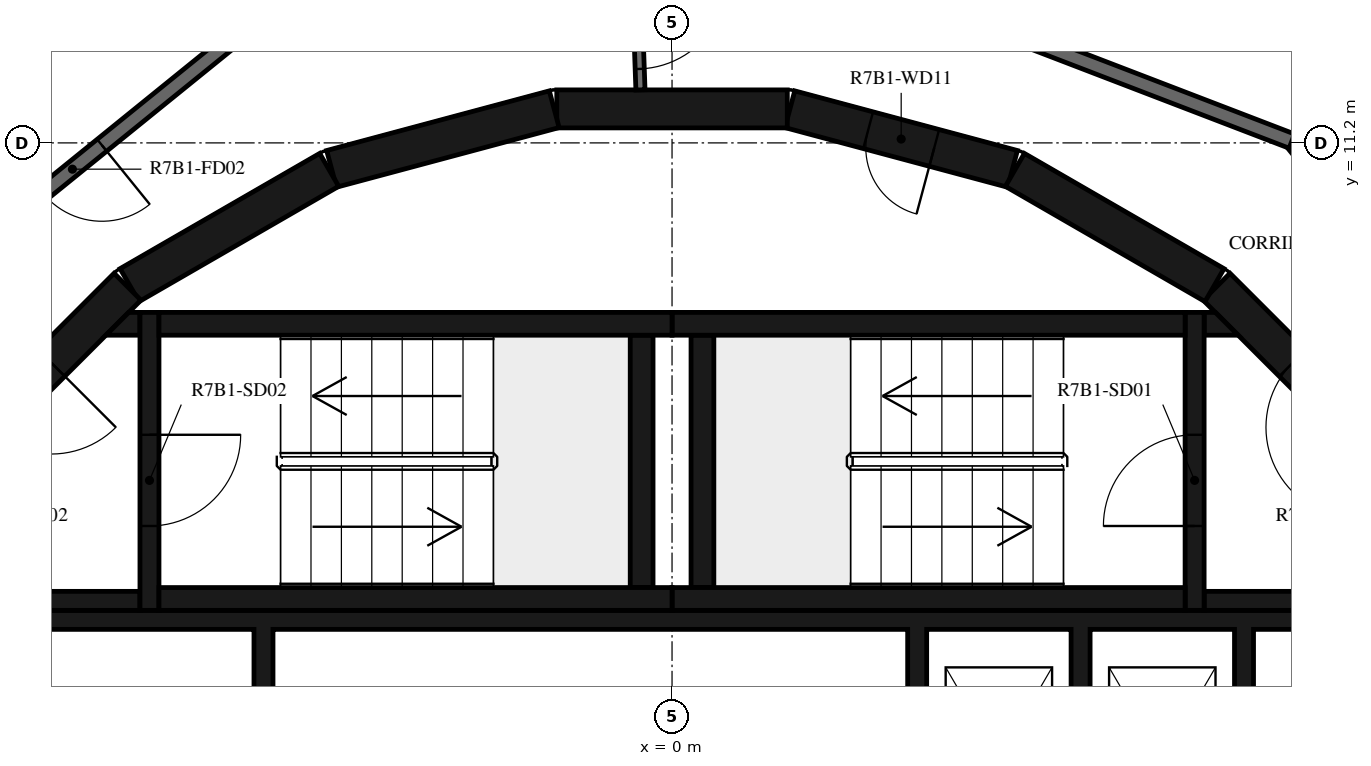
"""IFC4 building model, lengths in metres.
Left out: names, types, materials, properties, quantities, classifications, styles, units other than length and angle.
Written with IfcOpenShell. Run it as: python <this file> out.ifc"""

import sys

from ifc_helpers import new_model, si_unit, direction, frame, frame_2d, origin, place, context, subcontext, project, spatial, polyline, rectangle, outline, extrude, element, fill, save


model = new_model("IFC4")
c1 = context("Model", 3, precision=1e-05, world=origin(), true_north=direction((0.0, 1.0)))
c2 = subcontext(c1, "Body", "Model", "MODEL_VIEW")
j1 = project(units=[si_unit("LENGTHUNIT", "METRE"), si_unit("PLANEANGLEUNIT", "RADIAN")], contexts=[c1])
p1 = place(None, origin())
s1 = spatial("IfcSite", under=j1, at=p1, CompositionType="ELEMENT")
p2 = place(p1, origin())
s2 = spatial("IfcBuilding", under=s1, at=p2, CompositionType="ELEMENT")
p3 = place(p2, frame((0.0, 0.0, 273.9)))
s3 = spatial("IfcBuildingStorey", under=s2, at=p3, CompositionType="ELEMENT", Elevation=273.9)
p4 = place(p3, frame((9.308, 7.164, 0.0), z_axis=(0.0, 0.0, 1.0), x_axis=(-0.707106781187, 0.707106781187, 0.0)))
e1 = element("IfcWall", 1, at=p4, inside=s3, PredefinedType="SHEAR", context=c2, shape_type="SweptSolid", body=[
    extrude(rectangle(XDim=3.032, YDim=0.5, at=frame_2d((1.516, 0.0))), origin(), (0.0, 0.0, 1.0), 3.12),
])
p5 = place(p4, frame((0.416, 0.0, 0.0)))
e2 = element("IfcOpeningElement", 2, at=p5, cuts=e1, PredefinedType="OPENING", context=c2, shape_type="SweptSolid", body=[
    extrude(rectangle(XDim=1.2, YDim=2.1, at=frame_2d((0.6, 1.05))), frame((0.0, 0.26, 0.0), z_axis=(0.0, -1.0, 0.0), x_axis=(1.0, 0.0, 0.0)), (0.0, 0.0, 1.0), 0.52),
])
p6 = place(p3, frame((7.137, 9.329, 0.0), z_axis=(0.0, 0.0, 1.0), x_axis=(-0.865975092491, 0.500087131594, 0.0)))
e3 = element("IfcWall", 3, at=p6, inside=s3, PredefinedType="SHEAR", context=c2, shape_type="SweptSolid", body=[
    extrude(rectangle(XDim=3.033, YDim=0.5, at=frame_2d((1.516, 0.0))), origin(), (0.0, 0.0, 1.0), 3.12),
])
p7 = place(p3, frame((4.479, 10.858, 0.0), z_axis=(0.0, 0.0, 1.0), x_axis=(-0.965948410781, 0.258734743916, 0.0)))
e4 = element("IfcWall", 4, at=p7, inside=s3, PredefinedType="SHEAR", context=c2, shape_type="SweptSolid", body=[
    extrude(rectangle(XDim=3.033, YDim=0.5, at=frame_2d((1.516, 0.0))), origin(), (0.0, 0.0, 1.0), 3.12),
])
p8 = place(p7, frame((1.066, 0.0, 0.0)))
e5 = element("IfcOpeningElement", 5, at=p8, cuts=e4, PredefinedType="OPENING", context=c2, shape_type="SweptSolid", body=[
    extrude(rectangle(XDim=0.9, YDim=2.1, at=frame_2d((0.45, 1.05))), frame((0.0, 0.26, 0.0), z_axis=(0.0, -1.0, 0.0), x_axis=(1.0, 0.0, 0.0)), (0.0, 0.0, 1.0), 0.52),
])
for number, where, z_axis, x_axis in (
    (6, (1.516, 11.647, 0.0), (0.0, 0.0, 1.0), (-1.0, 0.0, 0.0)),
    (7, (-1.55, 11.643, 0.0), (0.0, 0.0, 1.0), (-0.966, -0.259, 0.0)),
    (8, (-4.51, 10.845, 0.0), (0.0, 0.0, 1.0), (-0.866, -0.5, 0.0)),
):
    element("IfcWall", number, at=place(p3, frame(where, z_axis=z_axis, x_axis=x_axis)), inside=s3, PredefinedType="SHEAR", context=c2, shape_type="SweptSolid", body=[
        extrude(rectangle(XDim=3.033, YDim=0.5, at=frame_2d((1.516, 0.0))), origin(), (0.0, 0.0, 1.0), 3.12),
    ])
p9 = place(p3, frame((-7.164, 9.308, 0.0), z_axis=(0.0, 0.0, 1.0), x_axis=(-0.707106781187, -0.707106781187, 0.0)))
e9 = element("IfcWall", 9, at=p9, inside=s3, PredefinedType="SHEAR", context=c2, shape_type="SweptSolid", body=[
    extrude(rectangle(XDim=3.032, YDim=0.5, at=frame_2d((1.516, 0.0))), origin(), (0.0, 0.0, 1.0), 3.12),
])
p10 = place(p9, frame((1.416, 0.0, 0.0)))
e10 = element("IfcOpeningElement", 10, at=p10, cuts=e9, PredefinedType="OPENING", context=c2, shape_type="SweptSolid", body=[
    extrude(rectangle(XDim=1.2, YDim=2.1, at=frame_2d((0.6, 1.05))), frame((0.0, 0.26, 0.0), z_axis=(0.0, -1.0, 0.0), x_axis=(1.0, 0.0, 0.0)), (0.0, 0.0, 1.0), 0.52),
])
for number, where, z_axis, x_axis in (
    (11, (0.0, 5.2, 0.0), (0.0, 0.0, 1.0), (1.0, 0.0, 0.0)),
    (12, (0.0, 8.82, 0.0), (0.0, 0.0, 1.0), (1.0, 0.0, 0.0)),
):
    element("IfcWall", number, at=place(p3, frame(where, z_axis=z_axis, x_axis=x_axis)), inside=s3, PredefinedType="SHEAR", context=c2, shape_type="SweptSolid", body=[
        extrude(rectangle(XDim=6.75, YDim=0.3, at=frame_2d((3.375, 0.0))), origin(), (0.0, 0.0, 1.0), 3.12),
    ])
p11 = place(p3, frame((0.4, 5.35, 0.0), z_axis=(0.0, 0.0, 1.0), x_axis=(0.0, 1.0, 0.0)))
e13 = element("IfcWall", 13, at=p11, inside=s3, PredefinedType="SHEAR", context=c2, shape_type="SweptSolid", body=[
    extrude(rectangle(XDim=3.32, YDim=0.3, at=frame_2d((1.66, 0.0))), origin(), (0.0, 0.0, 1.0), 3.12),
])
p12 = place(p3, frame((6.875, 5.05, 0.0), z_axis=(0.0, 0.0, 1.0), x_axis=(0.0, 1.0, 0.0)))
e14 = element("IfcWall", 14, at=p12, inside=s3, PredefinedType="SHEAR", context=c2, shape_type="SweptSolid", body=[
    extrude(rectangle(XDim=3.92, YDim=0.25, at=frame_2d((1.96, 0.0))), origin(), (0.0, 0.0, 1.0), 3.12),
])
p13 = place(p12, frame((1.11, 0.0, 0.0)))
e15 = element("IfcOpeningElement", 15, at=p13, cuts=e14, PredefinedType="OPENING", context=c2, shape_type="SweptSolid", body=[
    extrude(rectangle(XDim=1.2, YDim=2.1, at=frame_2d((0.6, 1.05))), frame((0.0, 0.135, 0.0), z_axis=(0.0, -1.0, 0.0), x_axis=(1.0, 0.0, 0.0)), (0.0, 0.0, 1.0), 0.27),
])
p14 = place(p3, frame((7.0, 5.175, 0.0), z_axis=(0.0, 0.0, 1.0), x_axis=(1.0, 0.0, 0.0)))
e16 = element("IfcWall", 16, at=p14, inside=s3, PredefinedType="SHEAR", context=c2, shape_type="SweptSolid", body=[
    extrude(rectangle(XDim=3.1, YDim=0.25, at=frame_2d((1.55, 0.0))), origin(), (0.0, 0.0, 1.0), 3.12),
])
p15 = place(p3, origin())
e17 = element("IfcWall", 17, at=p15, inside=s3, PredefinedType="SHEAR", context=c2, shape_type="SweptSolid", body=[
    extrude(outline(polyline([(7.448, 8.67), (7.0, 8.67), (7.0, 8.97), (7.148, 8.97), (7.448, 8.67)])), origin(), (0.0, 0.0, 1.0), 3.12),
])
for number, where, z_axis, x_axis in (
    (18, (-6.75, 5.2, 0.0), (0.0, 0.0, 1.0), (1.0, 0.0, 0.0)),
    (19, (-6.75, 8.82, 0.0), (0.0, 0.0, 1.0), (1.0, 0.0, 0.0)),
):
    element("IfcWall", number, at=place(p3, frame(where, z_axis=z_axis, x_axis=x_axis)), inside=s3, PredefinedType="SHEAR", context=c2, shape_type="SweptSolid", body=[
        extrude(rectangle(XDim=6.75, YDim=0.3, at=frame_2d((3.375, 0.0))), origin(), (0.0, 0.0, 1.0), 3.12),
    ])
p16 = place(p3, frame((-0.4, 5.35, 0.0), z_axis=(0.0, 0.0, 1.0), x_axis=(0.0, 1.0, 0.0)))
e20 = element("IfcWall", 20, at=p16, inside=s3, PredefinedType="SHEAR", context=c2, shape_type="SweptSolid", body=[
    extrude(rectangle(XDim=3.32, YDim=0.3, at=frame_2d((1.66, 0.0))), origin(), (0.0, 0.0, 1.0), 3.12),
])
p17 = place(p3, frame((-6.875, 8.97, 0.0), z_axis=(0.0, 0.0, 1.0), x_axis=(0.0, -1.0, 0.0)))
e21 = element("IfcWall", 21, at=p17, inside=s3, PredefinedType="SHEAR", context=c2, shape_type="SweptSolid", body=[
    extrude(rectangle(XDim=3.92, YDim=0.25, at=frame_2d((1.96, 0.0))), origin(), (0.0, 0.0, 1.0), 3.12),
])
p18 = place(p17, frame((1.61, 0.0, 0.0)))
e22 = element("IfcOpeningElement", 22, at=p18, cuts=e21, PredefinedType="OPENING", context=c2, shape_type="SweptSolid", body=[
    extrude(rectangle(XDim=1.2, YDim=2.1, at=frame_2d((0.6, 1.05))), frame((0.0, 0.135, 0.0), z_axis=(0.0, -1.0, 0.0), x_axis=(1.0, 0.0, 0.0)), (0.0, 0.0, 1.0), 0.27),
])
p19 = place(p3, frame((-7.0, 5.175, 0.0), z_axis=(0.0, 0.0, 1.0), x_axis=(-1.0, 0.0, 0.0)))
e23 = element("IfcWall", 23, at=p19, inside=s3, PredefinedType="SHEAR", context=c2, shape_type="SweptSolid", body=[
    extrude(rectangle(XDim=3.1, YDim=0.25, at=frame_2d((1.55, 0.0))), origin(), (0.0, 0.0, 1.0), 3.12),
])
p20 = place(p3, origin())
e24 = element("IfcWall", 24, at=p20, inside=s3, PredefinedType="SHEAR", context=c2, shape_type="SweptSolid", body=[
    extrude(outline(polyline([(-7.148, 8.97), (-7.0, 8.97), (-7.0, 8.67), (-7.448, 8.67), (-7.148, 8.97)])), origin(), (0.0, 0.0, 1.0), 3.12),
])
p21 = place(p3, origin())
e25 = element("IfcWall", 25, at=p21, inside=s3, PredefinedType="SHEAR", context=c2, shape_type="SweptSolid", body=[
    extrude(outline(polyline([(-9.8, 1.9), (-9.55, 1.9), (-9.55, 4.8), (-5.5, 4.8), (-5.5, 1.9), (-5.25, 1.9), (-5.25, 4.8), (3.1, 4.8), (3.1, 1.9), (3.35, 1.9), (3.35, 4.8), (5.25, 4.8), (5.25, 1.9), (5.5, 1.9), (5.5, 4.8), (7.4, 4.8), (7.4, 1.9), (7.65, 1.9), (7.65, 4.8), (9.55, 4.8), (9.55, 1.9), (9.8, 1.9), (9.8, 4.8), (9.8, 5.05), (-9.8, 5.05), (-9.8, 4.8), (-9.8, 1.9)])), origin(), (0.0, 0.0, 1.0), 3.12),
])
p22 = place(p3, frame((-0.471, 13.492, 0.0), z_axis=(0.0, 0.0, 1.0), x_axis=(0.034873173869, -0.999391745886, 0.0)))
e26 = element("IfcWall", 26, at=p22, inside=s3, PredefinedType="PARTITIONING", context=c2, shape_type="SweptSolid", body=[
    extrude(rectangle(XDim=1.596, YDim=0.12, at=frame_2d((0.798, 0.0))), origin(), (0.0, 0.0, 1.0), 3.12),
])
p23 = place(p22, frame((0.12, 0.0, 0.0)))
e27 = element("IfcOpeningElement", 27, at=p23, cuts=e26, PredefinedType="OPENING", context=c2, shape_type="SweptSolid", body=[
    extrude(rectangle(XDim=1.2, YDim=2.1, at=frame_2d((0.6, 1.05))), frame((0.0, 0.07, 0.0), z_axis=(0.0, -1.0, 0.0), x_axis=(1.0, 0.0, 0.0)), (0.0, 0.0, 1.0), 0.14),
])
p24 = place(p3, frame((12.673, 5.643, 0.0), z_axis=(0.0, 0.0, 1.0), x_axis=(-0.629302871585, 0.777160148113, 0.0)))
e28 = element("IfcWall", 28, at=p24, inside=s3, PredefinedType="STANDARD", context=c2, shape_type="SweptSolid", body=[
    extrude(rectangle(XDim=7.181, YDim=0.2, at=frame_2d((3.59, 0.0))), origin(), (0.0, 0.0, 1.0), 3.12),
])
p25 = place(p24, frame((4.1, 0.0, 0.0)))
e29 = element("IfcOpeningElement", 29, at=p25, cuts=e28, PredefinedType="OPENING", context=c2, shape_type="SweptSolid", body=[
    extrude(rectangle(XDim=1.0, YDim=2.1, at=frame_2d((0.5, 1.05))), frame((0.0, 0.11, 0.0), z_axis=(0.0, -1.0, 0.0), x_axis=(1.0, 0.0, 0.0)), (0.0, 0.0, 1.0), 0.22),
])
p26 = place(p3, frame((8.154, 11.223, 0.0), z_axis=(0.0, 0.0, 1.0), x_axis=(-0.93359073609, 0.358341090983, 0.0)))
e30 = element("IfcWall", 30, at=p26, inside=s3, PredefinedType="STANDARD", context=c2, shape_type="SweptSolid", body=[
    extrude(rectangle(XDim=7.181, YDim=0.2, at=frame_2d((3.59, 0.0))), origin(), (0.0, 0.0, 1.0), 3.12),
])
p27 = place(p3, frame((-5.643, 12.673, 0.0), z_axis=(0.0, 0.0, 1.0), x_axis=(-0.777160148113, -0.629302871585, 0.0)))
e31 = element("IfcWall", 31, at=p27, inside=s3, PredefinedType="STANDARD", context=c2, shape_type="SweptSolid", body=[
    extrude(rectangle(XDim=7.181, YDim=0.2, at=frame_2d((3.59, 0.0))), origin(), (0.0, 0.0, 1.0), 3.12),
])
p28 = place(p27, frame((2.39, 0.0, 0.0)))
e32 = element("IfcOpeningElement", 32, at=p28, cuts=e31, PredefinedType="OPENING", context=c2, shape_type="SweptSolid", body=[
    extrude(rectangle(XDim=1.0, YDim=2.1, at=frame_2d((0.5, 1.05))), frame((0.0, 0.11, 0.0), z_axis=(0.0, -1.0, 0.0), x_axis=(1.0, 0.0, 0.0)), (0.0, 0.0, 1.0), 0.22),
])
p29 = place(p27, frame((5.192, 0.0, 0.0)))
e33 = element("IfcOpeningElement", 33, at=p29, cuts=e31, PredefinedType="OPENING", context=c2, shape_type="SweptSolid", body=[
    extrude(rectangle(XDim=1.0, YDim=2.1, at=frame_2d((0.5, 1.05))), frame((0.0, 0.11, 0.0), z_axis=(0.0, -1.0, 0.0), x_axis=(1.0, 0.0, 0.0)), (0.0, 0.0, 1.0), 0.22),
])
p30 = place(p3, frame((-6.274, 14.092, 0.0), z_axis=(0.0, 0.0, 1.0), x_axis=(-0.777162268892, -0.629300252511, 0.0)))
e34 = element("IfcWall", 34, at=p30, inside=s3, PredefinedType="PARTITIONING", context=c2, shape_type="SweptSolid", body=[
    extrude(rectangle(XDim=3.992, YDim=0.12, at=frame_2d((1.996, 0.0))), origin(), (0.0, 0.0, 1.0), 3.12),
])
p31 = place(p30, frame((0.2, 0.0, 0.0)))
e35 = element("IfcOpeningElement", 35, at=p31, cuts=e34, PredefinedType="OPENING", context=c2, shape_type="SweptSolid", body=[
    extrude(rectangle(XDim=0.9, YDim=2.1, at=frame_2d((0.45, 1.05))), frame((0.0, 0.07, 0.0), z_axis=(0.0, -1.0, 0.0), x_axis=(1.0, 0.0, 0.0)), (0.0, 0.0, 1.0), 0.14),
])
p32 = place(p13, origin())
e36 = element("IfcDoor", 36, at=p32, inside=s3, OperationType="SINGLE_SWING_LEFT", PredefinedType="DOOR", context=c2, shape_type="SweptSolid", body=[
    extrude(rectangle(XDim=1.2, YDim=2.1, at=frame_2d((0.6, 1.05))), frame((0.0, 0.025, 0.0), z_axis=(0.0, -1.0, 0.0), x_axis=(1.0, 0.0, 0.0)), (0.0, 0.0, 1.0), 0.05),
])
fill(e15, e36)
p33 = place(p5, origin())
e37 = element("IfcDoor", 37, at=p33, inside=s3, OperationType="SINGLE_SWING_RIGHT", PredefinedType="DOOR", context=c2, shape_type="SweptSolid", body=[
    extrude(rectangle(XDim=1.2, YDim=2.1, at=frame_2d((0.6, 1.05))), frame((0.0, 0.025, 0.0), z_axis=(0.0, -1.0, 0.0), x_axis=(1.0, 0.0, 0.0)), (0.0, 0.0, 1.0), 0.05),
])
fill(e2, e37)
p34 = place(p18, origin())
e38 = element("IfcDoor", 38, at=p34, inside=s3, OperationType="SINGLE_SWING_LEFT", PredefinedType="DOOR", context=c2, shape_type="SweptSolid", body=[
    extrude(rectangle(XDim=1.2, YDim=2.1, at=frame_2d((0.6, 1.05))), frame((0.0, 0.025, 0.0), z_axis=(0.0, -1.0, 0.0), x_axis=(1.0, 0.0, 0.0)), (0.0, 0.0, 1.0), 0.05),
])
fill(e22, e38)
p35 = place(p10, origin())
e39 = element("IfcDoor", 39, at=p35, inside=s3, OperationType="SINGLE_SWING_RIGHT", PredefinedType="DOOR", context=c2, shape_type="SweptSolid", body=[
    extrude(rectangle(XDim=1.2, YDim=2.1, at=frame_2d((0.6, 1.05))), frame((0.0, 0.025, 0.0), z_axis=(0.0, -1.0, 0.0), x_axis=(1.0, 0.0, 0.0)), (0.0, 0.0, 1.0), 0.05),
])
fill(e10, e39)
p36 = place(p8, origin())
e40 = element("IfcDoor", 40, at=p36, inside=s3, OperationType="SINGLE_SWING_LEFT", PredefinedType="DOOR", context=c2, shape_type="SweptSolid", body=[
    extrude(rectangle(XDim=0.9, YDim=2.1, at=frame_2d((0.45, 1.05))), frame((0.0, 0.025, 0.0), z_axis=(0.0, -1.0, 0.0), x_axis=(1.0, 0.0, 0.0)), (0.0, 0.0, 1.0), 0.05),
])
fill(e5, e40)
p37 = place(p28, origin())
e41 = element("IfcDoor", 41, at=p37, inside=s3, OperationType="SINGLE_SWING_RIGHT", PredefinedType="DOOR", context=c2, shape_type="SweptSolid", body=[
    extrude(rectangle(XDim=1.0, YDim=2.1, at=frame_2d((0.5, 1.05))), frame((0.0, 0.025, 0.0), z_axis=(0.0, -1.0, 0.0), x_axis=(1.0, 0.0, 0.0)), (0.0, 0.0, 1.0), 0.05),
])
fill(e32, e41)
p38 = place(p23, origin())
e42 = element("IfcDoor", 42, at=p38, inside=s3, OperationType="DOUBLE_DOOR_SINGLE_SWING", PredefinedType="DOOR", context=c2, shape_type="SweptSolid", body=[
    extrude(rectangle(XDim=1.2, YDim=2.1, at=frame_2d((0.6, 1.05))), frame((0.0, 0.025, 0.0), z_axis=(0.0, -1.0, 0.0), x_axis=(1.0, 0.0, 0.0)), (0.0, 0.0, 1.0), 0.05),
])
fill(e27, e42)
save(model, sys.argv[1])
